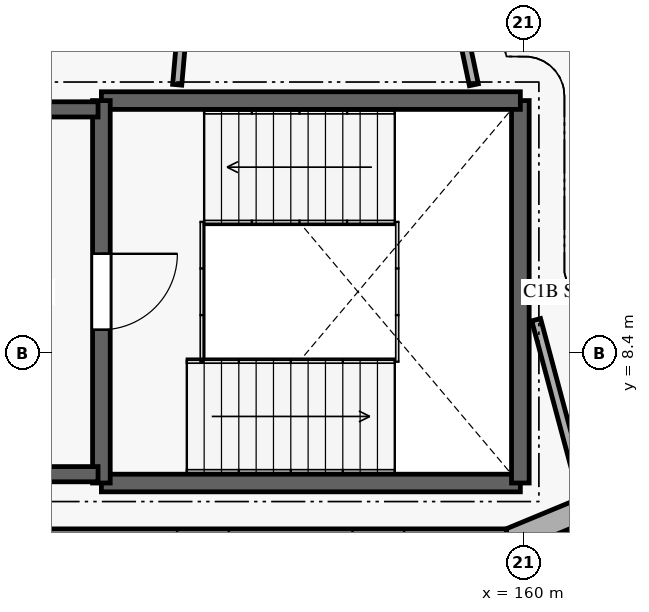
"""IFC4 building model, lengths in metres.
Left out: names, types, materials, properties, quantities, classifications, styles, units other than length and angle.
Written with IfcOpenShell. Run it as: python <this file> out.ifc"""

import sys

from ifc_helpers import new_model, si_unit, direction, frame, frame_2d, origin, place, context, subcontext, project, spatial, rectangle, extrude, element, fill, save


model = new_model("IFC4")
c1 = context("Model", 3, precision=1e-05, world=origin(), true_north=direction((0.0, 1.0)))
c2 = subcontext(c1, "Body", "Model", "MODEL_VIEW")
j1 = project(units=[si_unit("LENGTHUNIT", "METRE"), si_unit("PLANEANGLEUNIT", "RADIAN")], contexts=[c1])
p1 = place(None, origin())
s1 = spatial("IfcSite", under=j1, at=p1, CompositionType="ELEMENT")
p2 = place(p1, origin())
s2 = spatial("IfcBuilding", under=s1, at=p2, CompositionType="ELEMENT")
p3 = place(p2, frame((0.0, 0.0, 8.4)))
s3 = spatial("IfcBuildingStorey", under=s2, at=p3, CompositionType="ELEMENT", Elevation=8.4)
p4 = place(p3, frame((167.516, 8.517, 0.0), z_axis=(0.0, 0.0, 1.0), x_axis=(-0.923884604839, -0.382671186453, 0.0)))
e1 = element("IfcWall", 1, at=p4, inside=s3, PredefinedType="SOLIDWALL", context=c2, shape_type="SweptSolid", body=[
    extrude(rectangle(XDim=8.439, YDim=0.4, at=frame_2d((4.219, 0.0))), origin(), (0.0, 0.0, 1.0), 3.94),
])
p5 = place(p4, frame((0.935, 0.0, 0.85)))
e2 = element("IfcOpeningElement", 2, at=p5, cuts=e1, PredefinedType="OPENING", context=c2, shape_type="SweptSolid", body=[
    extrude(rectangle(XDim=2.35, YDim=1.5, at=frame_2d((1.175, 0.75))), frame((0.0, 0.21, 0.0), z_axis=(0.0, -1.0, 0.0), x_axis=(1.0, 0.0, 0.0)), (0.0, 0.0, 1.0), 0.42),
])
p6 = place(p4, frame((4.569, 0.0, 0.85)))
e3 = element("IfcOpeningElement", 3, at=p6, cuts=e1, PredefinedType="OPENING", context=c2, shape_type="SweptSolid", body=[
    extrude(rectangle(XDim=0.85, YDim=1.4, at=frame_2d((0.425, 0.7))), frame((0.0, 0.21, 0.0), z_axis=(0.0, -1.0, 0.0), x_axis=(1.0, 0.0, 0.0)), (0.0, 0.0, 1.0), 0.42),
])
p7 = place(p3, frame((159.719, 5.288, 0.0), z_axis=(0.0, 0.0, 1.0), x_axis=(-1.0, 0.0, 0.0)))
e4 = element("IfcWall", 4, at=p7, inside=s3, PredefinedType="SOLIDWALL", context=c2, shape_type="SweptSolid", body=[
    extrude(rectangle(XDim=8.438, YDim=0.425, at=frame_2d((4.219, 0.0))), origin(), (0.0, 0.0, 1.0), 3.94),
])
p8 = place(p7, frame((1.685, 0.0, 0.85)))
e5 = element("IfcOpeningElement", 5, at=p8, cuts=e4, PredefinedType="OPENING", context=c2, shape_type="SweptSolid", body=[
    extrude(rectangle(XDim=0.85, YDim=1.4, at=frame_2d((0.425, 0.7))), frame((0.0, 0.222, 0.0), z_axis=(0.0, -1.0, 0.0), x_axis=(1.0, 0.0, 0.0)), (0.0, 0.0, 1.0), 0.445),
])
p9 = place(p7, frame((4.569, 0.0, 0.85)))
e6 = element("IfcOpeningElement", 6, at=p9, cuts=e4, PredefinedType="OPENING", context=c2, shape_type="SweptSolid", body=[
    extrude(rectangle(XDim=0.85, YDim=1.4, at=frame_2d((0.425, 0.7))), frame((0.0, 0.222, 0.0), z_axis=(0.0, -1.0, 0.0), x_axis=(1.0, 0.0, 0.0)), (0.0, 0.0, 1.0), 0.445),
])
p10 = place(p3, frame((160.262, 4.251, 0.0), z_axis=(0.0, 0.0, 1.0), x_axis=(0.923877990426, 0.382687155267, 0.0)))
e7 = element("IfcWall", 7, at=p10, inside=s3, PredefinedType="ELEMENTEDWALL", context=c2, shape_type="SweptSolid", body=[
    extrude(rectangle(XDim=8.23, YDim=0.225, at=frame_2d((4.115, 0.0))), origin(), (0.0, 0.0, 1.0), 1.09),
])
p11 = place(p3, frame((153.055, 6.255, 0.0), z_axis=(0.0, 0.0, 1.0), x_axis=(1.0, 0.0, 0.0)))
e8 = element("IfcWall", 8, at=p11, inside=s3, PredefinedType="SHEAR", context=c2, shape_type="SweptSolid", body=[
    extrude(rectangle(XDim=6.89, YDim=0.29, at=frame_2d((3.445, 0.0))), origin(), (0.0, 0.0, 1.0), 3.95),
])
p12 = place(p3, frame((159.945, 6.255, 0.0), z_axis=(0.0, 0.0, 1.0), x_axis=(0.0, 1.0, 0.0)))
e9 = element("IfcWall", 9, at=p12, inside=s3, PredefinedType="SHEAR", context=c2, shape_type="SweptSolid", body=[
    extrude(rectangle(XDim=6.29, YDim=0.29, at=frame_2d((3.145, 0.0))), origin(), (0.0, 0.0, 1.0), 3.95),
])
p13 = place(p3, frame((159.945, 12.545, 0.0), z_axis=(0.0, 0.0, 1.0), x_axis=(-1.0, 0.0, 0.0)))
e10 = element("IfcWall", 10, at=p13, inside=s3, PredefinedType="SHEAR", context=c2, shape_type="SweptSolid", body=[
    extrude(rectangle(XDim=6.89, YDim=0.29, at=frame_2d((3.445, 0.0))), origin(), (0.0, 0.0, 1.0), 3.95),
])
p14 = place(p3, frame((153.055, 12.545, 0.0), z_axis=(0.0, 0.0, 1.0), x_axis=(0.0, -1.0, 0.0)))
e11 = element("IfcWall", 11, at=p14, inside=s3, PredefinedType="SHEAR", context=c2, shape_type="SweptSolid", body=[
    extrude(rectangle(XDim=6.29, YDim=0.29, at=frame_2d((3.145, 0.0))), origin(), (0.0, 0.0, 1.0), 3.95),
])
p15 = place(p14, frame((2.52, 0.0, 0.0)))
e12 = element("IfcOpeningElement", 12, at=p15, cuts=e11, PredefinedType="OPENING", context=c2, shape_type="SweptSolid", body=[
    extrude(rectangle(XDim=1.25, YDim=2.1, at=frame_2d((0.625, 1.05))), frame((0.0, 0.155, 0.0), z_axis=(0.0, -1.0, 0.0), x_axis=(1.0, 0.0, 0.0)), (0.0, 0.0, 1.0), 0.31),
])
p16 = place(p3, frame((149.8, 6.4, 0.0), z_axis=(0.0, 0.0, 1.0), x_axis=(1.0, 0.0, 0.0)))
e13 = element("IfcWall", 13, at=p16, inside=s3, PredefinedType="SHEAR", context=c2, shape_type="SweptSolid", body=[
    extrude(rectangle(XDim=3.2, YDim=0.25, at=frame_2d((1.6, 0.0))), origin(), (0.0, 0.0, 1.0), 3.95),
])
p17 = place(p3, frame((153.0, 12.4, 0.0), z_axis=(0.0, 0.0, 1.0), x_axis=(-1.0, 0.0, 0.0)))
e14 = element("IfcWall", 14, at=p17, inside=s3, PredefinedType="SHEAR", context=c2, shape_type="SweptSolid", body=[
    extrude(rectangle(XDim=3.2, YDim=0.25, at=frame_2d((1.6, 0.0))), origin(), (0.0, 0.0, 1.0), 3.95),
])
p18 = place(p17, frame((0.825, 0.0, 0.0)))
e15 = element("IfcOpeningElement", 15, at=p18, cuts=e14, PredefinedType="OPENING", context=c2, shape_type="SweptSolid", body=[
    extrude(rectangle(XDim=1.55, YDim=2.15, at=frame_2d((0.775, 1.075))), frame((0.0, 0.135, 0.0), z_axis=(0.0, -1.0, 0.0), x_axis=(1.0, 0.0, 0.0)), (0.0, 0.0, 1.0), 0.27),
])
p19 = place(p3, frame((154.302, 12.805, 0.0), z_axis=(0.0, 0.0, 1.0), x_axis=(0.08712978082, 0.996196969125, 0.0)))
e16 = element("IfcWall", 16, at=p19, inside=s3, PredefinedType="PARTITIONING", context=c2, shape_type="SweptSolid", body=[
    extrude(rectangle(XDim=3.096, YDim=0.15, at=frame_2d((1.548, 0.0))), origin(), (0.0, 0.0, 1.0), 3.915),
])
p20 = place(p3, frame((158.499, 16.056, 0.0), z_axis=(0.0, 0.0, 1.0), x_axis=(0.205069487246, -0.978747416549, 0.0)))
e17 = element("IfcWall", 17, at=p20, inside=s3, PredefinedType="PARTITIONING", context=c2, shape_type="SweptSolid", body=[
    extrude(rectangle(XDim=3.322, YDim=0.15, at=frame_2d((1.661, 0.0))), origin(), (0.0, 0.0, 1.0), 3.915),
])
p21 = place(p3, frame((160.205, 8.941, 0.0), z_axis=(0.0, 0.0, 1.0), x_axis=(0.258795954476, -0.965932013108, 0.0)))
e18 = element("IfcWall", 18, at=p21, inside=s3, PredefinedType="PARTITIONING", context=c2, shape_type="SweptSolid", body=[
    extrude(rectangle(XDim=2.99, YDim=0.15, at=frame_2d((1.495, 0.0))), origin(), (0.0, 0.0, 1.0), 3.915),
])
p22 = place(p15, origin())
e19 = element("IfcDoor", 19, at=p22, inside=s3, OperationType="SINGLE_SWING_LEFT", PredefinedType="DOOR", context=c2, shape_type="SweptSolid", body=[
    extrude(rectangle(XDim=1.25, YDim=2.1, at=frame_2d((0.625, 1.05))), frame((0.0, 0.025, 0.0), z_axis=(0.0, -1.0, 0.0), x_axis=(1.0, 0.0, 0.0)), (0.0, 0.0, 1.0), 0.05),
])
fill(e12, e19)
save(model, sys.argv[1])
